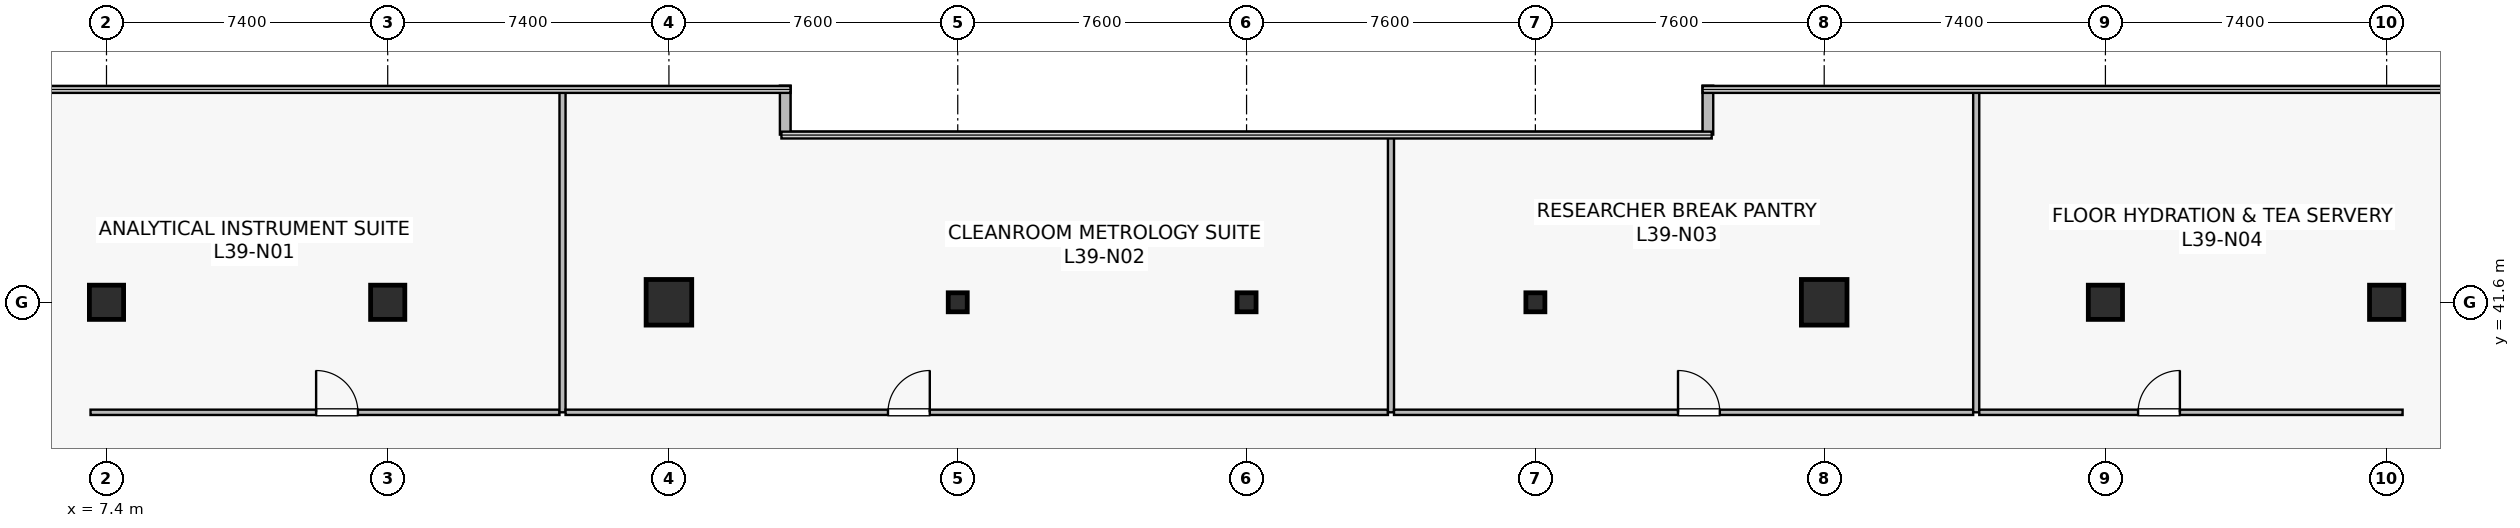
"""IFC4 building model, lengths in metres.
Left out: names, types, materials, properties, quantities, classifications, styles, units other than length and angle.
Written with IfcOpenShell. Run it as: python <this file> out.ifc"""

import sys

from ifc_helpers import new_model, si_unit, direction, frame, frame_2d, origin, origin_2d, place, context, subcontext, project, spatial, rectangle, hollow_rectangle, extrude, source, transform, mapped, element, fill, save


model = new_model("IFC4")
c1 = context("Model", 3, precision=1e-05, world=origin(), true_north=direction((0.0, 1.0)))
c2 = subcontext(c1, "Body", "Model", "MODEL_VIEW")
j1 = project(units=[si_unit("LENGTHUNIT", "METRE"), si_unit("PLANEANGLEUNIT", "RADIAN")], contexts=[c1])
p1 = place(None, origin())
s1 = spatial("IfcSite", under=j1, at=p1, CompositionType="ELEMENT")
p2 = place(p1, origin())
s2 = spatial("IfcBuilding", under=s1, at=p2, CompositionType="ELEMENT")
p3 = place(p2, frame((0.0, 0.0, 162.5)))
s3 = spatial("IfcBuildingStorey", under=s2, at=p3, CompositionType="ELEMENT", Elevation=162.5)
m1 = source(origin(), c2, "Body", "SweptSolid", [
    extrude(rectangle(XDim=0.9, YDim=0.9, at=origin_2d()), origin(), (0.0, 0.0, 1.0), 4.1),
])
p4 = place(p3, frame((14.8, 41.6, 0.0), z_axis=(0.0, 0.0, 1.0), x_axis=(1.0, 0.0, 0.0)))
e1 = element("IfcColumn", 1, at=p4, inside=s3, PredefinedType="COLUMN", context=c2, shape_type="MappedRepresentation", body=[
    mapped(m1, transform((0.0, 0.0, 0.0), scale=1.0)),
])
m2 = source(origin(), c2, "Body", "SweptSolid", [
    extrude(rectangle(XDim=1.2, YDim=1.2, at=origin_2d()), origin(), (0.0, 0.0, 1.0), 4.1),
])
for number, where, z_axis, x_axis in (
    (2, (22.2, 41.6, 0.0), (0.0, 0.0, 1.0), (1.0, 0.0, 0.0)),
    (3, (52.6, 41.6, 0.0), (0.0, 0.0, 1.0), (1.0, 0.0, 0.0)),
):
    element("IfcColumn", number, at=place(p3, frame(where, z_axis=z_axis, x_axis=x_axis)), inside=s3, PredefinedType="COLUMN", context=c2, shape_type="MappedRepresentation", body=[
        mapped(m2, transform((0.0, 0.0, 0.0), scale=1.0)),
    ])
for number, where, z_axis, x_axis in (
    (4, (60.0, 41.6, 0.0), (0.0, 0.0, 1.0), (1.0, 0.0, 0.0)),
    (5, (7.4, 41.6, 0.0), (0.0, 0.0, 1.0), (1.0, 0.0, 0.0)),
    (6, (67.4, 41.6, 0.0), (0.0, 0.0, 1.0), (1.0, 0.0, 0.0)),
):
    element("IfcColumn", number, at=place(p3, frame(where, z_axis=z_axis, x_axis=x_axis)), inside=s3, PredefinedType="COLUMN", context=c2, shape_type="MappedRepresentation", body=[
        mapped(m1, transform((0.0, 0.0, 0.0), scale=1.0)),
    ])
m3 = source(origin(), c2, "Body", "SweptSolid", [
    extrude(hollow_rectangle(XDim=0.5, YDim=0.5, WallThickness=0.022, at=origin_2d()), origin(), (0.0, 0.0, 1.0), 4.1),
])
for number, where, z_axis, x_axis in (
    (7, (29.8, 41.6, 0.0), (0.0, 0.0, 1.0), (1.0, 0.0, 0.0)),
    (8, (37.4, 41.6, 0.0), (0.0, 0.0, 1.0), (1.0, 0.0, 0.0)),
    (9, (45.0, 41.6, 0.0), (0.0, 0.0, 1.0), (1.0, 0.0, 0.0)),
):
    element("IfcColumn", number, at=place(p3, frame(where, z_axis=z_axis, x_axis=x_axis)), inside=s3, PredefinedType="COLUMN", context=c2, shape_type="MappedRepresentation", body=[
        mapped(m3, transform((0.0, 0.0, 0.0), scale=1.0)),
    ])
for number, where, z_axis, x_axis in (
    (10, (49.54, 47.3, 0.0), (0.0, 0.0, 1.0), (0.0, -1.0, 0.0)),
    (11, (25.26, 46.012, 0.0), (0.0, 0.0, 1.0), (0.0, 1.0, 0.0)),
):
    element("IfcWall", number, at=place(p3, frame(where, z_axis=z_axis, x_axis=x_axis)), inside=s3, PredefinedType="STANDARD", context=c2, shape_type="SweptSolid", body=[
        extrude(rectangle(XDim=1.288, YDim=0.28, at=frame_2d((0.644, 0.0))), origin(), (0.0, 0.0, 1.0), 3.79),
    ])
p5 = place(p3, frame((6.98, 38.705, 0.0), z_axis=(0.0, 0.0, 1.0), x_axis=(1.0, 0.0, 0.0)))
e12 = element("IfcWall", 12, at=p5, inside=s3, PredefinedType="PARTITIONING", context=c2, shape_type="SweptSolid", body=[
    extrude(rectangle(XDim=12.34, YDim=0.14, at=frame_2d((6.17, 0.0))), origin(), (0.0, 0.0, 1.0), 3.187),
])
p6 = place(p5, frame((5.936, 0.0, 0.0)))
e13 = element("IfcOpeningElement", 13, at=p6, cuts=e12, PredefinedType="OPENING", context=c2, shape_type="SweptSolid", body=[
    extrude(rectangle(XDim=1.1, YDim=2.18, at=frame_2d((0.55, 1.09))), frame((0.0, 0.08, 0.0), z_axis=(0.0, -1.0, 0.0), x_axis=(1.0, 0.0, 0.0)), (0.0, 0.0, 1.0), 0.16),
])
p7 = place(p3, frame((19.4, 38.705, 0.0), z_axis=(0.0, 0.0, 1.0), x_axis=(0.0, 1.0, 0.0)))
e14 = element("IfcWall", 14, at=p7, inside=s3, PredefinedType="PARTITIONING", context=c2, shape_type="SweptSolid", body=[
    extrude(rectangle(XDim=8.485, YDim=0.16, at=frame_2d((4.242, 0.0))), origin(), (0.0, 0.0, 1.0), 3.075),
])
p8 = place(p3, frame((19.48, 38.705, 0.0), z_axis=(0.0, 0.0, 1.0), x_axis=(1.0, 0.0, 0.0)))
e15 = element("IfcWall", 15, at=p8, inside=s3, PredefinedType="PARTITIONING", context=c2, shape_type="SweptSolid", body=[
    extrude(rectangle(XDim=21.64, YDim=0.14, at=frame_2d((10.82, 0.0))), origin(), (0.0, 0.0, 1.0), 3.187),
])
p9 = place(p8, frame((8.484, 0.0, 0.0)))
e16 = element("IfcOpeningElement", 16, at=p9, cuts=e15, PredefinedType="OPENING", context=c2, shape_type="SweptSolid", body=[
    extrude(rectangle(XDim=1.1, YDim=2.18, at=frame_2d((0.55, 1.09))), frame((0.0, 0.08, 0.0), z_axis=(0.0, -1.0, 0.0), x_axis=(1.0, 0.0, 0.0)), (0.0, 0.0, 1.0), 0.16),
])
p10 = place(p3, frame((41.2, 38.705, 0.0), z_axis=(0.0, 0.0, 1.0), x_axis=(0.0, 1.0, 0.0)))
e17 = element("IfcWall", 17, at=p10, inside=s3, PredefinedType="PARTITIONING", context=c2, shape_type="SweptSolid", body=[
    extrude(rectangle(XDim=7.285, YDim=0.16, at=frame_2d((3.643, 0.0))), origin(), (0.0, 0.0, 1.0), 3.075),
])
p11 = place(p3, frame((41.28, 38.705, 0.0), z_axis=(0.0, 0.0, 1.0), x_axis=(1.0, 0.0, 0.0)))
e18 = element("IfcWall", 18, at=p11, inside=s3, PredefinedType="PARTITIONING", context=c2, shape_type="SweptSolid", body=[
    extrude(rectangle(XDim=15.24, YDim=0.14, at=frame_2d((7.62, 0.0))), origin(), (0.0, 0.0, 1.0), 3.187),
])
p12 = place(p11, frame((7.473, 0.0, 0.0)))
e19 = element("IfcOpeningElement", 19, at=p12, cuts=e18, PredefinedType="OPENING", context=c2, shape_type="SweptSolid", body=[
    extrude(rectangle(XDim=1.1, YDim=2.18, at=frame_2d((0.55, 1.09))), frame((0.0, 0.08, 0.0), z_axis=(0.0, -1.0, 0.0), x_axis=(1.0, 0.0, 0.0)), (0.0, 0.0, 1.0), 0.16),
])
p13 = place(p3, frame((56.6, 38.705, 0.0), z_axis=(0.0, 0.0, 1.0), x_axis=(0.0, 1.0, 0.0)))
e20 = element("IfcWall", 20, at=p13, inside=s3, PredefinedType="PARTITIONING", context=c2, shape_type="SweptSolid", body=[
    extrude(rectangle(XDim=8.485, YDim=0.16, at=frame_2d((4.242, 0.0))), origin(), (0.0, 0.0, 1.0), 3.075),
])
p14 = place(p3, frame((56.68, 38.705, 0.0), z_axis=(0.0, 0.0, 1.0), x_axis=(1.0, 0.0, 0.0)))
e21 = element("IfcWall", 21, at=p14, inside=s3, PredefinedType="PARTITIONING", context=c2, shape_type="SweptSolid", body=[
    extrude(rectangle(XDim=11.14, YDim=0.14, at=frame_2d((5.57, 0.0))), origin(), (0.0, 0.0, 1.0), 3.187),
])
p15 = place(p14, frame((4.179, 0.0, 0.0)))
e22 = element("IfcOpeningElement", 22, at=p15, cuts=e21, PredefinedType="OPENING", context=c2, shape_type="SweptSolid", body=[
    extrude(rectangle(XDim=1.1, YDim=2.18, at=frame_2d((0.55, 1.09))), frame((0.0, 0.08, 0.0), z_axis=(0.0, -1.0, 0.0), x_axis=(1.0, 0.0, 0.0)), (0.0, 0.0, 1.0), 0.16),
])
m4 = source(origin(), c2, "Body", "SweptSolid", [
    extrude(rectangle(XDim=1.1, YDim=2.18, at=frame_2d((0.55, 1.09))), frame((0.0, 0.025, 0.0), z_axis=(0.0, -1.0, 0.0), x_axis=(1.0, 0.0, 0.0)), (0.0, 0.0, 1.0), 0.05),
])
p16 = place(p6, origin())
e23 = element("IfcDoor", 23, at=p16, inside=s3, OperationType="SINGLE_SWING_LEFT", PredefinedType="DOOR", context=c2, shape_type="MappedRepresentation", body=[
    mapped(m4, transform((0.0, 0.0, 0.0), scale=1.0)),
])
fill(e13, e23)
p17 = place(p9, origin())
e24 = element("IfcDoor", 24, at=p17, inside=s3, OperationType="SINGLE_SWING_RIGHT", PredefinedType="DOOR", context=c2, shape_type="MappedRepresentation", body=[
    mapped(m4, transform((0.0, 0.0, 0.0), scale=1.0)),
])
fill(e16, e24)
p18 = place(p12, origin())
e25 = element("IfcDoor", 25, at=p18, inside=s3, OperationType="SINGLE_SWING_LEFT", PredefinedType="DOOR", context=c2, shape_type="MappedRepresentation", body=[
    mapped(m4, transform((0.0, 0.0, 0.0), scale=1.0)),
])
fill(e19, e25)
p19 = place(p15, origin())
e26 = element("IfcDoor", 26, at=p19, inside=s3, OperationType="SINGLE_SWING_RIGHT", PredefinedType="DOOR", context=c2, shape_type="MappedRepresentation", body=[
    mapped(m4, transform((0.0, 0.0, 0.0), scale=1.0)),
])
fill(e22, e26)
save(model, sys.argv[1])
